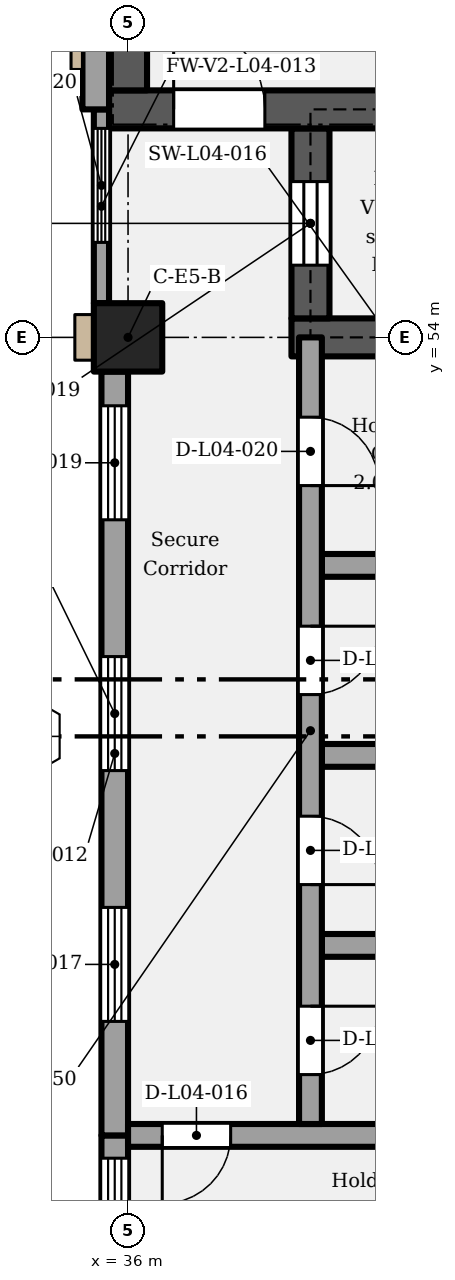
"""IFC4 building model, lengths in metres.
Left out: names, types, materials, properties, quantities, classifications, styles, units other than length and angle.
Written with IfcOpenShell. Run it as: python <this file> out.ifc"""

import sys

from ifc_helpers import new_model, si_unit, direction, frame, frame_2d, origin, origin_2d, place, context, subcontext, project, spatial, rectangle, extrude, element, fill, save


model = new_model("IFC4")
c1 = context("Model", 3, precision=1e-05, world=origin(), true_north=direction((0.0, 1.0)))
c2 = subcontext(c1, "Body", "Model", "MODEL_VIEW")
j1 = project(units=[si_unit("LENGTHUNIT", "METRE"), si_unit("PLANEANGLEUNIT", "RADIAN")], contexts=[c1])
p1 = place(None, origin())
s1 = spatial("IfcSite", under=j1, at=p1, CompositionType="ELEMENT")
p2 = place(p1, origin())
s2 = spatial("IfcBuilding", under=s1, at=p2, CompositionType="ELEMENT")
p3 = place(p2, frame((0.0, 0.0, 22.8)))
s3 = spatial("IfcBuildingStorey", under=s2, at=p3, CompositionType="ELEMENT", Elevation=22.8)
p4 = place(p3, frame((36.0, 54.0, 0.0), z_axis=(0.0, 0.0, 1.0), x_axis=(1.0, 0.0, 0.0)))
e1 = element("IfcColumn", 1, at=p4, inside=s3, PredefinedType="COLUMN", context=c2, shape_type="SweptSolid", body=[
    extrude(rectangle(XDim=0.9, YDim=0.9, at=origin_2d()), origin(), (0.0, 0.0, 1.0), 5.4),
])
p5 = place(p3, frame((38.15, 54.0, 0.0), z_axis=(0.0, 0.0, 1.0), x_axis=(1.0, 0.0, 0.0)))
e2 = element("IfcWall", 2, at=p5, inside=s3, PredefinedType="SHEAR", context=c2, shape_type="SweptSolid", body=[
    extrude(rectangle(XDim=2.6, YDim=0.5, at=frame_2d((1.3, 0.0))), origin(), (0.0, 0.0, 1.0), 5.15),
])
p6 = place(p3, frame((38.4, 54.25, 0.0), z_axis=(0.0, 0.0, 1.0), x_axis=(0.0, 1.0, 0.0)))
e3 = element("IfcWall", 3, at=p6, inside=s3, PredefinedType="SHEAR", context=c2, shape_type="SweptSolid", body=[
    extrude(rectangle(XDim=2.5, YDim=0.5, at=frame_2d((1.25, 0.0))), origin(), (0.0, 0.0, 1.0), 5.15),
])
p7 = place(p6, frame((0.7, 0.0, 0.0)))
e4 = element("IfcOpeningElement", 4, at=p7, cuts=e3, PredefinedType="OPENING", context=c2, shape_type="SweptSolid", body=[
    extrude(rectangle(XDim=1.1, YDim=2.1, at=frame_2d((0.55, 1.05))), frame((0.0, 0.26, 0.0), z_axis=(0.0, -1.0, 0.0), x_axis=(1.0, 0.0, 0.0)), (0.0, 0.0, 1.0), 0.52),
])
p8 = place(p3, frame((35.75, 57.0, 0.0), z_axis=(0.0, 0.0, 1.0), x_axis=(1.0, 0.0, 0.0)))
e5 = element("IfcWall", 5, at=p8, inside=s3, PredefinedType="SHEAR", context=c2, shape_type="SweptSolid", body=[
    extrude(rectangle(XDim=4.5, YDim=0.5, at=frame_2d((2.25, 0.0))), origin(), (0.0, 0.0, 1.0), 5.15),
])
p9 = place(p8, frame((0.85, 0.0, 0.0)))
e6 = element("IfcOpeningElement", 6, at=p9, cuts=e5, PredefinedType="OPENING", context=c2, shape_type="SweptSolid", body=[
    extrude(rectangle(XDim=1.2, YDim=2.1, at=frame_2d((0.6, 1.05))), frame((0.0, 0.26, 0.0), z_axis=(0.0, -1.0, 0.0), x_axis=(1.0, 0.0, 0.0)), (0.0, 0.0, 1.0), 0.52),
])
p10 = place(p3, frame((36.0, 57.25, 0.0), z_axis=(0.0, 0.0, 1.0), x_axis=(0.0, 1.0, 0.0)))
e7 = element("IfcWall", 7, at=p10, inside=s3, PredefinedType="SHEAR", context=c2, shape_type="SweptSolid", body=[
    extrude(rectangle(XDim=8.3, YDim=0.5, at=frame_2d((4.15, 0.0))), origin(), (0.0, 0.0, 1.0), 5.15),
])
p11 = place(p3, frame((35.825, 37.95, 0.0), z_axis=(0.0, 0.0, 1.0), x_axis=(0.0, 1.0, 0.0)))
e8 = element("IfcWall", 8, at=p11, inside=s3, PredefinedType="SOLIDWALL", context=c2, shape_type="SweptSolid", body=[
    extrude(rectangle(XDim=5.55, YDim=0.35, at=frame_2d((2.775, 0.0))), origin(), (0.0, 0.0, 1.0), 5.15),
])
p12 = place(p11, frame((0.45, 0.0, 1.05)))
e9 = element("IfcOpeningElement", 9, at=p12, cuts=e8, PredefinedType="OPENING", context=c2, shape_type="SweptSolid", body=[
    extrude(rectangle(XDim=1.5, YDim=3.5, at=frame_2d((0.75, 1.75))), frame((0.0, 0.185, 0.0), z_axis=(0.0, -1.0, 0.0), x_axis=(1.0, 0.0, 0.0)), (0.0, 0.0, 1.0), 0.37),
])
p13 = place(p11, frame((3.75, 0.0, 1.05)))
e10 = element("IfcOpeningElement", 10, at=p13, cuts=e8, PredefinedType="OPENING", context=c2, shape_type="SweptSolid", body=[
    extrude(rectangle(XDim=1.5, YDim=3.5, at=frame_2d((0.75, 1.75))), frame((0.0, 0.185, 0.0), z_axis=(0.0, -1.0, 0.0), x_axis=(1.0, 0.0, 0.0)), (0.0, 0.0, 1.0), 0.37),
])
p14 = place(p3, frame((35.825, 43.5, 0.0), z_axis=(0.0, 0.0, 1.0), x_axis=(0.0, 1.0, 0.0)))
e11 = element("IfcWall", 11, at=p14, inside=s3, PredefinedType="SOLIDWALL", context=c2, shape_type="SweptSolid", body=[
    extrude(rectangle(XDim=10.05, YDim=0.35, at=frame_2d((5.025, 0.0))), origin(), (0.0, 0.0, 1.0), 5.15),
])
p15 = place(p14, frame((1.5, 0.0, 1.05)))
e12 = element("IfcOpeningElement", 12, at=p15, cuts=e11, PredefinedType="OPENING", context=c2, shape_type="SweptSolid", body=[
    extrude(rectangle(XDim=1.5, YDim=3.5, at=frame_2d((0.75, 1.75))), frame((0.0, 0.185, 0.0), z_axis=(0.0, -1.0, 0.0), x_axis=(1.0, 0.0, 0.0)), (0.0, 0.0, 1.0), 0.37),
])
p16 = place(p14, frame((4.8, 0.0, 1.05)))
e13 = element("IfcOpeningElement", 13, at=p16, cuts=e11, PredefinedType="OPENING", context=c2, shape_type="SweptSolid", body=[
    extrude(rectangle(XDim=1.5, YDim=3.5, at=frame_2d((0.75, 1.75))), frame((0.0, 0.185, 0.0), z_axis=(0.0, -1.0, 0.0), x_axis=(1.0, 0.0, 0.0)), (0.0, 0.0, 1.0), 0.37),
])
p17 = place(p14, frame((8.1, 0.0, 1.05)))
e14 = element("IfcOpeningElement", 14, at=p17, cuts=e11, PredefinedType="OPENING", context=c2, shape_type="SweptSolid", body=[
    extrude(rectangle(XDim=1.5, YDim=3.5, at=frame_2d((0.75, 1.75))), frame((0.0, 0.185, 0.0), z_axis=(0.0, -1.0, 0.0), x_axis=(1.0, 0.0, 0.0)), (0.0, 0.0, 1.0), 0.37),
])
p18 = place(p3, frame((35.65, 54.45, 0.0), z_axis=(0.0, 0.0, 1.0), x_axis=(0.0, 1.0, 0.0)))
e15 = element("IfcWall", 15, at=p18, inside=s3, PredefinedType="SOLIDWALL", context=c2, shape_type="SweptSolid", body=[
    extrude(rectangle(XDim=2.55, YDim=0.2, at=frame_2d((1.275, 0.0))), origin(), (0.0, 0.0, 1.0), 5.15),
])
p19 = place(p18, frame((0.8, 0.0, 1.05)))
e16 = element("IfcOpeningElement", 16, at=p19, cuts=e15, PredefinedType="OPENING", context=c2, shape_type="SweptSolid", body=[
    extrude(rectangle(XDim=1.5, YDim=3.5, at=frame_2d((0.75, 1.75))), frame((0.0, 0.11, 0.0), z_axis=(0.0, -1.0, 0.0), x_axis=(1.0, 0.0, 0.0)), (0.0, 0.0, 1.0), 0.22),
])
p20 = place(p3, frame((35.575, 57.0, 0.0), z_axis=(0.0, 0.0, 1.0), x_axis=(0.0, 1.0, 0.0)))
e17 = element("IfcWall", 17, at=p20, inside=s3, PredefinedType="SOLIDWALL", context=c2, shape_type="SweptSolid", body=[
    extrude(rectangle(XDim=8.55, YDim=0.35, at=frame_2d((4.275, 0.0))), origin(), (0.0, 0.0, 1.0), 5.15),
])
p21 = place(p3, frame((36.0, 43.5, 0.0), z_axis=(0.0, 0.0, 1.0), x_axis=(1.0, 0.0, 0.0)))
e18 = element("IfcWall", 18, at=p21, inside=s3, PredefinedType="PARTITIONING", context=c2, shape_type="SweptSolid", body=[
    extrude(rectangle(XDim=9.0, YDim=0.3, at=frame_2d((4.5, 0.0))), origin(), (0.0, 0.0, 1.0), 5.15),
])
p22 = place(p21, frame((1.35, 0.0, 0.0), z_axis=(0.0, 0.0, 1.0), x_axis=(-1.0, 0.0, 0.0)))
e19 = element("IfcOpeningElement", 19, at=p22, cuts=e18, PredefinedType="OPENING", context=c2, shape_type="SweptSolid", body=[
    extrude(rectangle(XDim=0.9, YDim=2.1, at=frame_2d((0.45, 1.05))), frame((0.0, 0.16, 0.0), z_axis=(0.0, -1.0, 0.0), x_axis=(1.0, 0.0, 0.0)), (0.0, 0.0, 1.0), 0.32),
])
for number, where, z_axis, x_axis in (
    (20, (38.55, 46.0, 0.0), (0.0, 0.0, 1.0), (1.0, 0.0, 0.0)),
    (21, (38.55, 48.5, 0.0), (0.0, 0.0, 1.0), (1.0, 0.0, 0.0)),
    (22, (38.55, 51.0, 0.0), (0.0, 0.0, 1.0), (1.0, 0.0, 0.0)),
):
    element("IfcWall", number, at=place(p3, frame(where, z_axis=z_axis, x_axis=x_axis)), inside=s3, PredefinedType="PARTITIONING", context=c2, shape_type="SweptSolid", body=[
        extrude(rectangle(XDim=1.8, YDim=0.3, at=frame_2d((0.9, 0.0))), origin(), (0.0, 0.0, 1.0), 5.15),
    ])
p23 = place(p3, frame((38.4, 43.65, 0.0), z_axis=(0.0, 0.0, 1.0), x_axis=(0.0, 1.0, 0.0)))
e23 = element("IfcWall", 23, at=p23, inside=s3, PredefinedType="PARTITIONING", context=c2, shape_type="SweptSolid", body=[
    extrude(rectangle(XDim=10.35, YDim=0.3, at=frame_2d((5.175, 0.0))), origin(), (0.0, 0.0, 1.0), 5.15),
])
p24 = place(p23, frame((1.55, 0.0, 0.0), z_axis=(0.0, 0.0, 1.0), x_axis=(-1.0, 0.0, 0.0)))
e24 = element("IfcOpeningElement", 24, at=p24, cuts=e23, PredefinedType="OPENING", context=c2, shape_type="SweptSolid", body=[
    extrude(rectangle(XDim=0.9, YDim=2.0, at=frame_2d((0.45, 1.0))), frame((0.0, 0.16, 0.0), z_axis=(0.0, -1.0, 0.0), x_axis=(1.0, 0.0, 0.0)), (0.0, 0.0, 1.0), 0.32),
])
p25 = place(p23, frame((4.05, 0.0, 0.0), z_axis=(0.0, 0.0, 1.0), x_axis=(-1.0, 0.0, 0.0)))
e25 = element("IfcOpeningElement", 25, at=p25, cuts=e23, PredefinedType="OPENING", context=c2, shape_type="SweptSolid", body=[
    extrude(rectangle(XDim=0.9, YDim=2.0, at=frame_2d((0.45, 1.0))), frame((0.0, 0.16, 0.0), z_axis=(0.0, -1.0, 0.0), x_axis=(1.0, 0.0, 0.0)), (0.0, 0.0, 1.0), 0.32),
])
p26 = place(p23, frame((6.55, 0.0, 0.0), z_axis=(0.0, 0.0, 1.0), x_axis=(-1.0, 0.0, 0.0)))
e26 = element("IfcOpeningElement", 26, at=p26, cuts=e23, PredefinedType="OPENING", context=c2, shape_type="SweptSolid", body=[
    extrude(rectangle(XDim=0.9, YDim=2.0, at=frame_2d((0.45, 1.0))), frame((0.0, 0.16, 0.0), z_axis=(0.0, -1.0, 0.0), x_axis=(1.0, 0.0, 0.0)), (0.0, 0.0, 1.0), 0.32),
])
p27 = place(p23, frame((9.3, 0.0, 0.0), z_axis=(0.0, 0.0, 1.0), x_axis=(-1.0, 0.0, 0.0)))
e27 = element("IfcOpeningElement", 27, at=p27, cuts=e23, PredefinedType="OPENING", context=c2, shape_type="SweptSolid", body=[
    extrude(rectangle(XDim=0.9, YDim=2.0, at=frame_2d((0.45, 1.0))), frame((0.0, 0.16, 0.0), z_axis=(0.0, -1.0, 0.0), x_axis=(1.0, 0.0, 0.0)), (0.0, 0.0, 1.0), 0.32),
])
p28 = place(p13, origin())
e28 = element("IfcWindow", 28, at=p28, inside=s3, PartitioningType="SINGLE_PANEL", PredefinedType="WINDOW", context=c2, shape_type="SweptSolid", body=[
    extrude(rectangle(XDim=1.5, YDim=3.5, at=frame_2d((0.75, 1.75))), frame((0.0, 0.03, 0.0), z_axis=(0.0, -1.0, 0.0), x_axis=(1.0, 0.0, 0.0)), (0.0, 0.0, 1.0), 0.06),
])
fill(e10, e28)
p29 = place(p15, origin())
e29 = element("IfcWindow", 29, at=p29, inside=s3, PartitioningType="SINGLE_PANEL", PredefinedType="WINDOW", context=c2, shape_type="SweptSolid", body=[
    extrude(rectangle(XDim=1.5, YDim=3.5, at=frame_2d((0.75, 1.75))), frame((0.0, 0.03, 0.0), z_axis=(0.0, -1.0, 0.0), x_axis=(1.0, 0.0, 0.0)), (0.0, 0.0, 1.0), 0.06),
])
fill(e12, e29)
p30 = place(p16, origin())
e30 = element("IfcWindow", 30, at=p30, inside=s3, PartitioningType="SINGLE_PANEL", PredefinedType="WINDOW", context=c2, shape_type="SweptSolid", body=[
    extrude(rectangle(XDim=1.5, YDim=3.5, at=frame_2d((0.75, 1.75))), frame((0.0, 0.03, 0.0), z_axis=(0.0, -1.0, 0.0), x_axis=(1.0, 0.0, 0.0)), (0.0, 0.0, 1.0), 0.06),
])
fill(e13, e30)
p31 = place(p17, origin())
e31 = element("IfcWindow", 31, at=p31, inside=s3, PartitioningType="SINGLE_PANEL", PredefinedType="WINDOW", context=c2, shape_type="SweptSolid", body=[
    extrude(rectangle(XDim=1.5, YDim=3.5, at=frame_2d((0.75, 1.75))), frame((0.0, 0.03, 0.0), z_axis=(0.0, -1.0, 0.0), x_axis=(1.0, 0.0, 0.0)), (0.0, 0.0, 1.0), 0.06),
])
fill(e14, e31)
p32 = place(p19, origin())
e32 = element("IfcWindow", 32, at=p32, inside=s3, PartitioningType="SINGLE_PANEL", PredefinedType="WINDOW", context=c2, shape_type="SweptSolid", body=[
    extrude(rectangle(XDim=1.5, YDim=3.5, at=frame_2d((0.75, 1.75))), frame((0.0, 0.03, 0.0), z_axis=(0.0, -1.0, 0.0), x_axis=(1.0, 0.0, 0.0)), (0.0, 0.0, 1.0), 0.06),
])
fill(e16, e32)
p33 = place(p7, origin())
e33 = element("IfcDoor", 33, at=p33, inside=s3, OperationType="SLIDING_TO_LEFT", PredefinedType="DOOR", context=c2, shape_type="SweptSolid", body=[
    extrude(rectangle(XDim=1.1, YDim=2.1, at=frame_2d((0.55, 1.05))), frame((0.0, 0.025, 0.0), z_axis=(0.0, -1.0, 0.0), x_axis=(1.0, 0.0, 0.0)), (0.0, 0.0, 1.0), 0.05),
])
fill(e4, e33)
p34 = place(p9, origin())
e34 = element("IfcDoor", 34, at=p34, inside=s3, OperationType="SINGLE_SWING_LEFT", PredefinedType="DOOR", context=c2, shape_type="SweptSolid", body=[
    extrude(rectangle(XDim=1.2, YDim=2.1, at=frame_2d((0.6, 1.05))), frame((0.0, 0.025, 0.0), z_axis=(0.0, -1.0, 0.0), x_axis=(1.0, 0.0, 0.0)), (0.0, 0.0, 1.0), 0.05),
])
fill(e6, e34)
p35 = place(p22, origin())
e35 = element("IfcDoor", 35, at=p35, inside=s3, OperationType="SINGLE_SWING_RIGHT", PredefinedType="DOOR", context=c2, shape_type="SweptSolid", body=[
    extrude(rectangle(XDim=0.9, YDim=2.1, at=frame_2d((0.45, 1.05))), frame((0.0, 0.025, 0.0), z_axis=(0.0, -1.0, 0.0), x_axis=(1.0, 0.0, 0.0)), (0.0, 0.0, 1.0), 0.05),
])
fill(e19, e35)
p36 = place(p24, origin())
e36 = element("IfcDoor", 36, at=p36, inside=s3, OperationType="SINGLE_SWING_LEFT", PredefinedType="DOOR", context=c2, shape_type="SweptSolid", body=[
    extrude(rectangle(XDim=0.9, YDim=2.0, at=frame_2d((0.45, 1.0))), frame((0.0, 0.025, 0.0), z_axis=(0.0, -1.0, 0.0), x_axis=(1.0, 0.0, 0.0)), (0.0, 0.0, 1.0), 0.05),
])
fill(e24, e36)
p37 = place(p25, origin())
e37 = element("IfcDoor", 37, at=p37, inside=s3, OperationType="SINGLE_SWING_RIGHT", PredefinedType="DOOR", context=c2, shape_type="SweptSolid", body=[
    extrude(rectangle(XDim=0.9, YDim=2.0, at=frame_2d((0.45, 1.0))), frame((0.0, 0.025, 0.0), z_axis=(0.0, -1.0, 0.0), x_axis=(1.0, 0.0, 0.0)), (0.0, 0.0, 1.0), 0.05),
])
fill(e25, e37)
p38 = place(p26, origin())
e38 = element("IfcDoor", 38, at=p38, inside=s3, OperationType="SINGLE_SWING_LEFT", PredefinedType="DOOR", context=c2, shape_type="SweptSolid", body=[
    extrude(rectangle(XDim=0.9, YDim=2.0, at=frame_2d((0.45, 1.0))), frame((0.0, 0.025, 0.0), z_axis=(0.0, -1.0, 0.0), x_axis=(1.0, 0.0, 0.0)), (0.0, 0.0, 1.0), 0.05),
])
fill(e26, e38)
p39 = place(p27, origin())
e39 = element("IfcDoor", 39, at=p39, inside=s3, OperationType="SINGLE_SWING_RIGHT", PredefinedType="DOOR", context=c2, shape_type="SweptSolid", body=[
    extrude(rectangle(XDim=0.9, YDim=2.0, at=frame_2d((0.45, 1.0))), frame((0.0, 0.025, 0.0), z_axis=(0.0, -1.0, 0.0), x_axis=(1.0, 0.0, 0.0)), (0.0, 0.0, 1.0), 0.05),
])
fill(e27, e39)
save(model, sys.argv[1])
